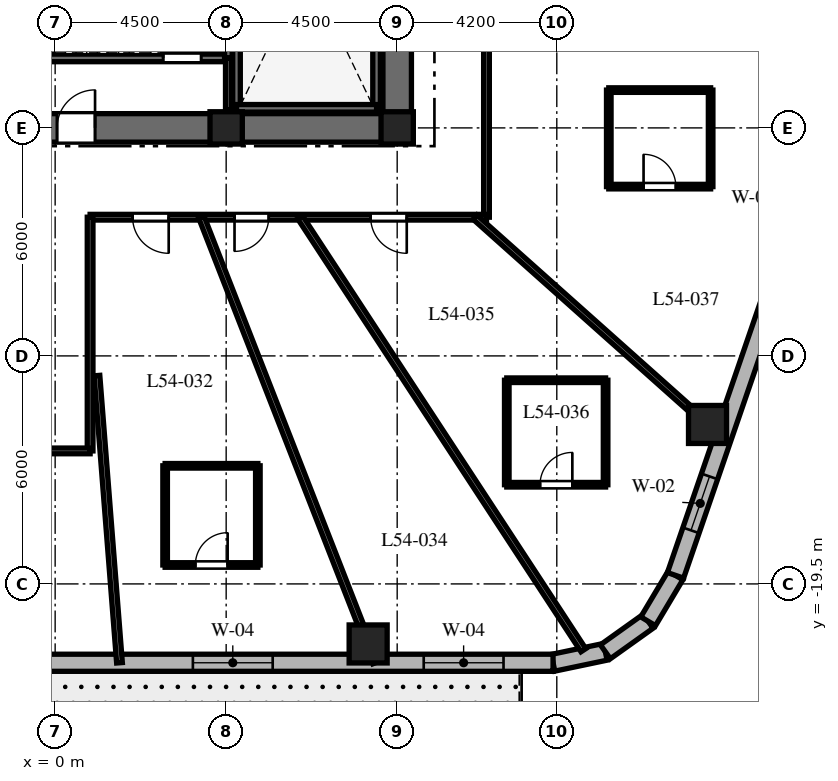
"""IFC4 building model, lengths in metres.
Left out: names, types, materials, properties, quantities, classifications, styles, units other than length and angle.
Written with IfcOpenShell. Run it as: python <this file> out.ifc"""

import sys

from ifc_helpers import new_model, si_unit, direction, frame, frame_2d, origin, origin_2d, place, context, subcontext, project, spatial, rectangle, extrude, element, fill, save


model = new_model("IFC4")
c1 = context("Model", 3, precision=1e-05, world=origin(), true_north=direction((0.0, 1.0)))
c2 = subcontext(c1, "Body", "Model", "MODEL_VIEW")
j1 = project(units=[si_unit("LENGTHUNIT", "METRE"), si_unit("PLANEANGLEUNIT", "RADIAN")], contexts=[c1])
p1 = place(None, origin())
s1 = spatial("IfcSite", under=j1, at=p1, CompositionType="ELEMENT")
p2 = place(p1, origin())
s2 = spatial("IfcBuilding", under=s1, at=p2, CompositionType="ELEMENT")
p3 = place(p2, frame((0.0, 0.0, 217.9)))
s3 = spatial("IfcBuildingStorey", under=s2, at=p3, CompositionType="ELEMENT", Elevation=217.9)
p4 = place(p3, frame((-9.375, -7.5, 0.0), z_axis=(0.0, 0.0, 1.0), x_axis=(1.0, 0.0, 0.0)))
e1 = element("IfcWall", 1, at=p4, inside=s3, PredefinedType="SHEAR", context=c2, shape_type="SweptSolid", body=[
    extrude(rectangle(XDim=18.75, YDim=0.75, at=frame_2d((9.375, 0.0))), origin(), (0.0, 0.0, 1.0), 3.8),
])
p5 = place(p4, frame((9.425, 0.0, 0.0)))
e2 = element("IfcOpeningElement", 2, at=p5, cuts=e1, PredefinedType="OPENING", context=c2, shape_type="SweptSolid", body=[
    extrude(rectangle(XDim=1.0, YDim=2.15, at=frame_2d((0.5, 1.075))), frame((0.0, 0.385, 0.0), z_axis=(0.0, -1.0, 0.0), x_axis=(1.0, 0.0, 0.0)), (0.0, 0.0, 1.0), 0.77),
])
p6 = place(p3, frame((9.0, -7.125, 0.0), z_axis=(0.0, 0.0, 1.0), x_axis=(0.0, 1.0, 0.0)))
e3 = element("IfcWall", 3, at=p6, inside=s3, PredefinedType="SHEAR", context=c2, shape_type="SweptSolid", body=[
    extrude(rectangle(XDim=14.25, YDim=0.75, at=frame_2d((7.125, 0.0))), origin(), (0.0, 0.0, 1.0), 3.8),
])
p7 = place(p6, frame((10.25, 0.0, 0.0)))
e4 = element("IfcOpeningElement", 4, at=p7, cuts=e3, PredefinedType="OPENING", context=c2, shape_type="SweptSolid", body=[
    extrude(rectangle(XDim=1.05, YDim=2.15, at=frame_2d((0.525, 1.075))), frame((0.0, 0.385, 0.0), z_axis=(0.0, -1.0, 0.0), x_axis=(1.0, 0.0, 0.0)), (0.0, 0.0, 1.0), 0.77),
])
for number, where, z_axis, x_axis in (
    (5, (4.772, -6.985, 0.0), (0.0, 0.0, 1.0), (0.0, 1.0, 0.0)),
    (6, (8.458, -6.985, 0.0), (0.0, 0.0, 1.0), (0.0, 1.0, 0.0)),
):
    element("IfcWall", number, at=place(p3, frame(where, z_axis=z_axis, x_axis=x_axis)), inside=s3, PredefinedType="SHEAR", context=c2, shape_type="SweptSolid", body=[
        extrude(rectangle(XDim=9.143, YDim=0.2, at=frame_2d((4.572, 0.0))), origin(), (0.0, 0.0, 1.0), 3.8),
    ])
p8 = place(p3, frame((4.772, -6.985, 0.0), z_axis=(0.0, 0.0, 1.0), x_axis=(1.0, 0.0, 0.0)))
e7 = element("IfcWall", 7, at=p8, inside=s3, PredefinedType="SHEAR", context=c2, shape_type="SweptSolid", body=[
    extrude(rectangle(XDim=3.686, YDim=0.2, at=frame_2d((1.843, 0.0))), origin(), (0.0, 0.0, 1.0), 3.8),
])
p9 = place(p3, frame((-4.608, -5.658, 0.0), z_axis=(0.0, 0.0, 1.0), x_axis=(1.0, 0.0, 0.0)))
e8 = element("IfcWall", 8, at=p9, inside=s3, PredefinedType="SHEAR", context=c2, shape_type="SweptSolid", body=[
    extrude(rectangle(XDim=9.166, YDim=0.2, at=frame_2d((4.583, 0.0))), origin(), (0.0, 0.0, 1.0), 3.8),
])
p10 = place(p9, frame((7.45, 0.0, 0.0)))
e9 = element("IfcOpeningElement", 9, at=p10, cuts=e8, PredefinedType="OPENING", context=c2, shape_type="SweptSolid", body=[
    extrude(rectangle(XDim=1.0, YDim=2.15, at=frame_2d((0.5, 1.075))), frame((0.0, 0.11, 0.0), z_axis=(0.0, -1.0, 0.0), x_axis=(1.0, 0.0, 0.0)), (0.0, 0.0, 1.0), 0.22),
])
p11 = place(p3, frame((4.558, -5.658, 0.0), z_axis=(0.0, 0.0, 1.0), x_axis=(0.0, 1.0, 0.0)))
e10 = element("IfcWall", 10, at=p11, inside=s3, PredefinedType="SHEAR", context=c2, shape_type="SweptSolid", body=[
    extrude(rectangle(XDim=3.686, YDim=0.2, at=frame_2d((1.843, 0.0))), origin(), (0.0, 0.0, 1.0), 3.8),
])
for number, where, z_axis, x_axis in (
    (11, (4.5, -7.5, 0.0), (0.0, 0.0, 1.0), (1.0, 0.0, 0.0)),
    (12, (9.0, -7.5, 0.0), (0.0, 0.0, 1.0), (1.0, 0.0, 0.0)),
):
    element("IfcColumn", number, at=place(p3, frame(where, z_axis=z_axis, x_axis=x_axis)), inside=s3, PredefinedType="COLUMN", context=c2, shape_type="SweptSolid", body=[
        extrude(rectangle(XDim=0.85, YDim=0.85, at=origin_2d()), origin(), (0.0, 0.0, 1.0), 3.8),
    ])
for number, where, z_axis, x_axis in (
    (13, (8.236, -21.08, 0.0), (0.0, 0.0, 1.0), (1.0, 0.0, 0.0)),
    (14, (17.166, -15.304, 0.0), (0.0, 0.0, 1.0), (1.0, 0.0, 0.0)),
):
    element("IfcColumn", number, at=place(p3, frame(where, z_axis=z_axis, x_axis=x_axis)), inside=s3, PredefinedType="COLUMN", context=c2, shape_type="SweptSolid", body=[
        extrude(rectangle(XDim=1.0, YDim=1.0, at=origin_2d()), origin(), (0.0, 0.0, 1.0), 3.8),
    ])
p12 = place(p3, frame((13.102, -21.575, 0.0), z_axis=(0.0, 0.0, 1.0), x_axis=(0.978757421505, 0.205021730188, 0.0)))
e15 = element("IfcWall", 15, at=p12, inside=s3, PredefinedType="SOLIDWALL", context=c2, shape_type="SweptSolid", body=[
    extrude(rectangle(XDim=1.406, YDim=0.45, at=frame_2d((0.703, 0.0))), origin(), (0.0, 0.0, 1.0), 3.5),
])
p13 = place(p3, frame((14.478, -21.287, 0.0), z_axis=(0.0, 0.0, 1.0), x_axis=(0.813888518617, 0.58102106611, 0.0)))
e16 = element("IfcWall", 16, at=p13, inside=s3, PredefinedType="SOLIDWALL", context=c2, shape_type="SweptSolid", body=[
    extrude(rectangle(XDim=1.383, YDim=0.45, at=frame_2d((0.691, 0.0))), origin(), (0.0, 0.0, 1.0), 3.5),
])
p14 = place(p3, frame((15.604, -20.483, 0.0), z_axis=(0.0, 0.0, 1.0), x_axis=(0.512222149036, 0.858852996756, 0.0)))
e17 = element("IfcWall", 17, at=p14, inside=s3, PredefinedType="SOLIDWALL", context=c2, shape_type="SweptSolid", body=[
    extrude(rectangle(XDim=1.406, YDim=0.45, at=frame_2d((0.703, 0.0))), origin(), (0.0, 0.0, 1.0), 3.5),
])
p15 = place(p3, frame((-11.298, -21.575, 0.0), z_axis=(0.0, 0.0, 1.0), x_axis=(1.0, 0.0, 0.0)))
e18 = element("IfcWall", 18, at=p15, inside=s3, PredefinedType="SOLIDWALL", context=c2, shape_type="SweptSolid", body=[
    extrude(rectangle(XDim=24.399, YDim=0.45, at=frame_2d((12.2, 0.0))), origin(), (0.0, 0.0, 1.0), 3.5),
])
p16 = place(p15, frame((2.55, 0.0, 0.0)))
e19 = element("IfcOpeningElement", 19, at=p16, cuts=e18, PredefinedType="OPENING", context=c2, shape_type="SweptSolid", body=[
    extrude(rectangle(XDim=1.0, YDim=2.15, at=frame_2d((0.5, 1.075))), frame((0.0, 0.235, 0.0), z_axis=(0.0, -1.0, 0.0), x_axis=(1.0, 0.0, 0.0)), (0.0, 0.0, 1.0), 0.47),
])
p17 = place(p15, frame((8.169, 0.0, 0.8)))
e20 = element("IfcOpeningElement", 20, at=p17, cuts=e18, PredefinedType="OPENING", context=c2, shape_type="SweptSolid", body=[
    extrude(rectangle(XDim=2.1, YDim=1.85, at=frame_2d((1.05, 0.925))), frame((0.0, 0.235, 0.0), z_axis=(0.0, -1.0, 0.0), x_axis=(1.0, 0.0, 0.0)), (0.0, 0.0, 1.0), 0.47),
])
p18 = place(p15, frame((14.922, 0.0, 0.8)))
e21 = element("IfcOpeningElement", 21, at=p18, cuts=e18, PredefinedType="OPENING", context=c2, shape_type="SweptSolid", body=[
    extrude(rectangle(XDim=2.1, YDim=1.85, at=frame_2d((1.05, 0.925))), frame((0.0, 0.235, 0.0), z_axis=(0.0, -1.0, 0.0), x_axis=(1.0, 0.0, 0.0)), (0.0, 0.0, 1.0), 0.47),
])
p19 = place(p15, frame((20.996, 0.0, 0.8)))
e22 = element("IfcOpeningElement", 22, at=p19, cuts=e18, PredefinedType="OPENING", context=c2, shape_type="SweptSolid", body=[
    extrude(rectangle(XDim=2.1, YDim=1.85, at=frame_2d((1.05, 0.925))), frame((0.0, 0.235, 0.0), z_axis=(0.0, -1.0, 0.0), x_axis=(1.0, 0.0, 0.0)), (0.0, 0.0, 1.0), 0.47),
])
p20 = place(p3, frame((16.324, -19.275, 0.0), z_axis=(0.0, 0.0, 1.0), x_axis=(0.325083142304, 0.945685439557, 0.0)))
e23 = element("IfcWall", 23, at=p20, inside=s3, PredefinedType="SOLIDWALL", context=c2, shape_type="SweptSolid", body=[
    extrude(rectangle(XDim=20.224, YDim=0.45, at=frame_2d((10.112, 0.0))), origin(), (0.0, 0.0, 1.0), 3.5),
])
p21 = place(p20, frame((1.253, 0.0, 0.8)))
e24 = element("IfcOpeningElement", 24, at=p21, cuts=e23, PredefinedType="OPENING", context=c2, shape_type="SweptSolid", body=[
    extrude(rectangle(XDim=1.5, YDim=1.8, at=frame_2d((0.75, 0.9))), frame((0.0, 0.235, 0.0), z_axis=(0.0, -1.0, 0.0), x_axis=(1.0, 0.0, 0.0)), (0.0, 0.0, 1.0), 0.47),
])
p22 = place(p20, frame((9.309, 0.0, 0.8)))
e25 = element("IfcOpeningElement", 25, at=p22, cuts=e23, PredefinedType="OPENING", context=c2, shape_type="SweptSolid", body=[
    extrude(rectangle(XDim=1.5, YDim=1.8, at=frame_2d((0.75, 0.9))), frame((0.0, 0.235, 0.0), z_axis=(0.0, -1.0, 0.0), x_axis=(1.0, 0.0, 0.0)), (0.0, 0.0, 1.0), 0.47),
])
p23 = place(p20, frame((17.418, 0.0, 0.8)))
e26 = element("IfcOpeningElement", 26, at=p23, cuts=e23, PredefinedType="OPENING", context=c2, shape_type="SweptSolid", body=[
    extrude(rectangle(XDim=1.5, YDim=1.8, at=frame_2d((0.75, 0.9))), frame((0.0, 0.235, 0.0), z_axis=(0.0, -1.0, 0.0), x_axis=(1.0, 0.0, 0.0)), (0.0, 0.0, 1.0), 0.47),
])
p24 = place(p3, frame((4.558, -7.02, 0.0), z_axis=(0.0, 0.0, 1.0), x_axis=(0.0, 1.0, 0.0)))
e27 = element("IfcWall", 27, at=p24, inside=s3, PredefinedType="PARTITIONING", context=c2, shape_type="SweptSolid", body=[
    extrude(rectangle(XDim=1.362, YDim=0.15, at=frame_2d((0.681, 0.0))), origin(), (0.0, 0.0, 1.0), 3.5),
])
p25 = place(p3, frame((11.35, -4.4, 0.0), z_axis=(0.0, 0.0, 1.0), x_axis=(0.0, -1.0, 0.0)))
e28 = element("IfcWall", 28, at=p25, inside=s3, PredefinedType="PARTITIONING", context=c2, shape_type="SweptSolid", body=[
    extrude(rectangle(XDim=5.45, YDim=0.15, at=frame_2d((2.725, 0.0))), origin(), (0.0, 0.0, 1.0), 2.99),
])
p26 = place(p3, frame((11.35, -9.85, 0.0), z_axis=(0.0, 0.0, 1.0), x_axis=(-1.0, 0.0, 0.0)))
e29 = element("IfcWall", 29, at=p26, inside=s3, PredefinedType="PARTITIONING", context=c2, shape_type="SweptSolid", body=[
    extrude(rectangle(XDim=10.43, YDim=0.15, at=frame_2d((5.215, 0.0))), origin(), (0.0, 0.0, 1.0), 2.99),
])
p27 = place(p26, frame((8.362, 0.0, 0.0)))
e30 = element("IfcOpeningElement", 30, at=p27, cuts=e29, PredefinedType="OPENING", context=c2, shape_type="SweptSolid", body=[
    extrude(rectangle(XDim=0.95, YDim=2.03, at=frame_2d((0.475, 1.015))), frame((0.0, 0.085, 0.0), z_axis=(0.0, -1.0, 0.0), x_axis=(1.0, 0.0, 0.0)), (0.0, 0.0, 1.0), 0.17),
])
p28 = place(p26, frame((5.73, 0.0, 0.0)))
e31 = element("IfcOpeningElement", 31, at=p28, cuts=e29, PredefinedType="OPENING", context=c2, shape_type="SweptSolid", body=[
    extrude(rectangle(XDim=0.9, YDim=2.03, at=frame_2d((0.45, 1.015))), frame((0.0, 0.085, 0.0), z_axis=(0.0, -1.0, 0.0), x_axis=(1.0, 0.0, 0.0)), (0.0, 0.0, 1.0), 0.17),
])
p29 = place(p26, frame((2.098, 0.0, 0.0)))
e32 = element("IfcOpeningElement", 32, at=p29, cuts=e29, PredefinedType="OPENING", context=c2, shape_type="SweptSolid", body=[
    extrude(rectangle(XDim=0.95, YDim=2.03, at=frame_2d((0.475, 1.015))), frame((0.0, 0.085, 0.0), z_axis=(0.0, -1.0, 0.0), x_axis=(1.0, 0.0, 0.0)), (0.0, 0.0, 1.0), 0.17),
])
p30 = place(p3, frame((0.92, -9.85, 0.0), z_axis=(0.0, 0.0, 1.0), x_axis=(0.0, -1.0, 0.0)))
e33 = element("IfcWall", 33, at=p30, inside=s3, PredefinedType="PARTITIONING", context=c2, shape_type="SweptSolid", body=[
    extrude(rectangle(XDim=6.15, YDim=0.15, at=frame_2d((3.075, 0.0))), origin(), (0.0, 0.0, 1.0), 3.027),
])
p31 = place(p3, frame((0.92, -16.0, 0.0), z_axis=(0.0, 0.0, 1.0), x_axis=(-1.0, 0.0, 0.0)))
e34 = element("IfcWall", 34, at=p31, inside=s3, PredefinedType="PARTITIONING", context=c2, shape_type="SweptSolid", body=[
    extrude(rectangle(XDim=1.84, YDim=0.15, at=frame_2d((0.92, 0.0))), origin(), (0.0, 0.0, 1.0), 3.5),
])
p32 = place(p3, frame((1.1, -14.018, 0.0), z_axis=(0.0, 0.0, 1.0), x_axis=(0.078228275349, -0.996935472804, 0.0)))
e35 = element("IfcWall", 35, at=p32, inside=s3, PredefinedType="PARTITIONING", context=c2, shape_type="SweptSolid", body=[
    extrude(rectangle(XDim=7.581, YDim=0.15, at=frame_2d((3.79, 0.0))), origin(), (0.0, 0.0, 1.0), 2.74),
])
p33 = place(p3, frame((3.848, -9.85, 0.0), z_axis=(0.0, 0.0, 1.0), x_axis=(0.363921778212, -0.931429513889, 0.0)))
e36 = element("IfcWall", 36, at=p33, inside=s3, PredefinedType="PARTITIONING", context=c2, shape_type="SweptSolid", body=[
    extrude(rectangle(XDim=12.588, YDim=0.15, at=frame_2d((6.294, 0.0))), origin(), (0.0, 0.0, 1.0), 2.74),
])
p34 = place(p3, frame((6.444, -9.85, 0.0), z_axis=(0.0, 0.0, 1.0), x_axis=(0.547492333129, -0.836810698525, 0.0)))
e37 = element("IfcWall", 37, at=p34, inside=s3, PredefinedType="PARTITIONING", context=c2, shape_type="SweptSolid", body=[
    extrude(rectangle(XDim=13.616, YDim=0.15, at=frame_2d((6.808, 0.0))), origin(), (0.0, 0.0, 1.0), 2.74),
])
p35 = place(p3, frame((11.048, -9.85, 0.0), z_axis=(0.0, 0.0, 1.0), x_axis=(0.746444434655, -0.665447748492, 0.0)))
e38 = element("IfcWall", 38, at=p35, inside=s3, PredefinedType="PARTITIONING", context=c2, shape_type="SweptSolid", body=[
    extrude(rectangle(XDim=8.732, YDim=0.15, at=frame_2d((4.366, 0.0))), origin(), (0.0, 0.0, 1.0), 2.74),
])
p36 = place(p3, frame((2.894, -19.002, 0.0), z_axis=(0.0, 0.0, 1.0), x_axis=(1.0, 0.0, 0.0)))
e39 = element("IfcWall", 39, at=p36, inside=s3, PredefinedType="PARTITIONING", context=c2, shape_type="SweptSolid", body=[
    extrude(rectangle(XDim=2.44, YDim=0.12, at=frame_2d((1.22, 0.0))), origin(), (0.0, 0.0, 1.0), 3.5),
])
p37 = place(p36, frame((0.795, 0.0, 0.0)))
e40 = element("IfcOpeningElement", 40, at=p37, cuts=e39, PredefinedType="OPENING", context=c2, shape_type="SweptSolid", body=[
    extrude(rectangle(XDim=0.85, YDim=2.03, at=frame_2d((0.425, 1.015))), frame((0.0, 0.07, 0.0), z_axis=(0.0, -1.0, 0.0), x_axis=(1.0, 0.0, 0.0)), (0.0, 0.0, 1.0), 0.14),
])
p38 = place(p3, frame((5.334, -19.002, 0.0), z_axis=(0.0, 0.0, 1.0), x_axis=(0.0, 1.0, 0.0)))
e41 = element("IfcWall", 41, at=p38, inside=s3, PredefinedType="PARTITIONING", context=c2, shape_type="SweptSolid", body=[
    extrude(rectangle(XDim=2.61, YDim=0.12, at=frame_2d((1.305, 0.0))), origin(), (0.0, 0.0, 1.0), 2.941),
])
p39 = place(p3, frame((5.334, -16.392, 0.0), z_axis=(0.0, 0.0, 1.0), x_axis=(-1.0, 0.0, 0.0)))
e42 = element("IfcWall", 42, at=p39, inside=s3, PredefinedType="PARTITIONING", context=c2, shape_type="SweptSolid", body=[
    extrude(rectangle(XDim=2.44, YDim=0.12, at=frame_2d((1.22, 0.0))), origin(), (0.0, 0.0, 1.0), 3.5),
])
p40 = place(p3, frame((2.894, -16.392, 0.0), z_axis=(0.0, 0.0, 1.0), x_axis=(0.0, -1.0, 0.0)))
e43 = element("IfcWall", 43, at=p40, inside=s3, PredefinedType="PARTITIONING", context=c2, shape_type="SweptSolid", body=[
    extrude(rectangle(XDim=2.61, YDim=0.12, at=frame_2d((1.305, 0.0))), origin(), (0.0, 0.0, 1.0), 2.941),
])
p41 = place(p3, frame((11.884, -16.89, 0.0), z_axis=(0.0, 0.0, 1.0), x_axis=(1.0, 0.0, 0.0)))
e44 = element("IfcWall", 44, at=p41, inside=s3, PredefinedType="PARTITIONING", context=c2, shape_type="SweptSolid", body=[
    extrude(rectangle(XDim=2.6, YDim=0.12, at=frame_2d((1.3, 0.0))), origin(), (0.0, 0.0, 1.0), 2.74),
])
p42 = place(p41, frame((0.875, 0.0, 0.0)))
e45 = element("IfcOpeningElement", 45, at=p42, cuts=e44, PredefinedType="OPENING", context=c2, shape_type="SweptSolid", body=[
    extrude(rectangle(XDim=0.85, YDim=2.03, at=frame_2d((0.425, 1.015))), frame((0.0, 0.07, 0.0), z_axis=(0.0, -1.0, 0.0), x_axis=(1.0, 0.0, 0.0)), (0.0, 0.0, 1.0), 0.14),
])
p43 = place(p3, frame((14.484, -16.89, 0.0), z_axis=(0.0, 0.0, 1.0), x_axis=(0.0, 1.0, 0.0)))
e46 = element("IfcWall", 46, at=p43, inside=s3, PredefinedType="PARTITIONING", context=c2, shape_type="SweptSolid", body=[
    extrude(rectangle(XDim=2.75, YDim=0.12, at=frame_2d((1.375, 0.0))), origin(), (0.0, 0.0, 1.0), 2.74),
])
p44 = place(p3, frame((14.484, -14.14, 0.0), z_axis=(0.0, 0.0, 1.0), x_axis=(-1.0, 0.0, 0.0)))
e47 = element("IfcWall", 47, at=p44, inside=s3, PredefinedType="PARTITIONING", context=c2, shape_type="SweptSolid", body=[
    extrude(rectangle(XDim=2.6, YDim=0.12, at=frame_2d((1.3, 0.0))), origin(), (0.0, 0.0, 1.0), 3.027),
])
p45 = place(p3, frame((11.884, -14.14, 0.0), z_axis=(0.0, 0.0, 1.0), x_axis=(0.0, -1.0, 0.0)))
e48 = element("IfcWall", 48, at=p45, inside=s3, PredefinedType="PARTITIONING", context=c2, shape_type="SweptSolid", body=[
    extrude(rectangle(XDim=2.75, YDim=0.12, at=frame_2d((1.375, 0.0))), origin(), (0.0, 0.0, 1.0), 3.027),
])
p46 = place(p3, frame((14.568, -9.045, 0.0), z_axis=(0.0, 0.0, 1.0), x_axis=(1.0, 0.0, 0.0)))
e49 = element("IfcWall", 49, at=p46, inside=s3, PredefinedType="PARTITIONING", context=c2, shape_type="SweptSolid", body=[
    extrude(rectangle(XDim=2.68, YDim=0.12, at=frame_2d((1.34, 0.0))), origin(), (0.0, 0.0, 1.0), 3.073),
])
p47 = place(p46, frame((0.915, 0.0, 0.0)))
e50 = element("IfcOpeningElement", 50, at=p47, cuts=e49, PredefinedType="OPENING", context=c2, shape_type="SweptSolid", body=[
    extrude(rectangle(XDim=0.85, YDim=2.03, at=frame_2d((0.425, 1.015))), frame((0.0, 0.07, 0.0), z_axis=(0.0, -1.0, 0.0), x_axis=(1.0, 0.0, 0.0)), (0.0, 0.0, 1.0), 0.14),
])
p48 = place(p3, frame((17.248, -9.045, 0.0), z_axis=(0.0, 0.0, 1.0), x_axis=(0.0, 1.0, 0.0)))
e51 = element("IfcWall", 51, at=p48, inside=s3, PredefinedType="PARTITIONING", context=c2, shape_type="SweptSolid", body=[
    extrude(rectangle(XDim=2.54, YDim=0.12, at=frame_2d((1.27, 0.0))), origin(), (0.0, 0.0, 1.0), 3.5),
])
p49 = place(p3, frame((17.248, -6.505, 0.0), z_axis=(0.0, 0.0, 1.0), x_axis=(-1.0, 0.0, 0.0)))
e52 = element("IfcWall", 52, at=p49, inside=s3, PredefinedType="PARTITIONING", context=c2, shape_type="SweptSolid", body=[
    extrude(rectangle(XDim=2.68, YDim=0.12, at=frame_2d((1.34, 0.0))), origin(), (0.0, 0.0, 1.0), 3.073),
])
p50 = place(p3, frame((14.568, -6.505, 0.0), z_axis=(0.0, 0.0, 1.0), x_axis=(0.0, -1.0, 0.0)))
e53 = element("IfcWall", 53, at=p50, inside=s3, PredefinedType="PARTITIONING", context=c2, shape_type="SweptSolid", body=[
    extrude(rectangle(XDim=2.54, YDim=0.12, at=frame_2d((1.27, 0.0))), origin(), (0.0, 0.0, 1.0), 3.5),
])
p51 = place(p18, origin())
e54 = element("IfcWindow", 54, at=p51, inside=s3, PartitioningType="SINGLE_PANEL", PredefinedType="WINDOW", context=c2, shape_type="SweptSolid", body=[
    extrude(rectangle(XDim=2.1, YDim=1.85, at=frame_2d((1.05, 0.925))), frame((0.0, 0.03, 0.0), z_axis=(0.0, -1.0, 0.0), x_axis=(1.0, 0.0, 0.0)), (0.0, 0.0, 1.0), 0.06),
])
fill(e21, e54)
p52 = place(p19, origin())
e55 = element("IfcWindow", 55, at=p52, inside=s3, PartitioningType="SINGLE_PANEL", PredefinedType="WINDOW", context=c2, shape_type="SweptSolid", body=[
    extrude(rectangle(XDim=2.1, YDim=1.85, at=frame_2d((1.05, 0.925))), frame((0.0, 0.03, 0.0), z_axis=(0.0, -1.0, 0.0), x_axis=(1.0, 0.0, 0.0)), (0.0, 0.0, 1.0), 0.06),
])
fill(e22, e55)
p53 = place(p21, origin())
e56 = element("IfcWindow", 56, at=p53, inside=s3, PartitioningType="SINGLE_PANEL", PredefinedType="WINDOW", context=c2, shape_type="SweptSolid", body=[
    extrude(rectangle(XDim=1.5, YDim=1.8, at=frame_2d((0.75, 0.9))), frame((0.0, 0.03, 0.0), z_axis=(0.0, -1.0, 0.0), x_axis=(1.0, 0.0, 0.0)), (0.0, 0.0, 1.0), 0.06),
])
fill(e24, e56)
p54 = place(p10, origin())
e57 = element("IfcDoor", 57, at=p54, inside=s3, OperationType="SINGLE_SWING_LEFT", PredefinedType="DOOR", context=c2, shape_type="SweptSolid", body=[
    extrude(rectangle(XDim=1.0, YDim=2.15, at=frame_2d((0.5, 1.075))), frame((0.0, 0.025, 0.0), z_axis=(0.0, -1.0, 0.0), x_axis=(1.0, 0.0, 0.0)), (0.0, 0.0, 1.0), 0.05),
])
fill(e9, e57)
p55 = place(p5, origin())
e58 = element("IfcDoor", 58, at=p55, inside=s3, OperationType="SINGLE_SWING_RIGHT", PredefinedType="DOOR", context=c2, shape_type="SweptSolid", body=[
    extrude(rectangle(XDim=1.0, YDim=2.15, at=frame_2d((0.5, 1.075))), frame((0.0, 0.025, 0.0), z_axis=(0.0, -1.0, 0.0), x_axis=(1.0, 0.0, 0.0)), (0.0, 0.0, 1.0), 0.05),
])
fill(e2, e58)
p56 = place(p27, origin())
e59 = element("IfcDoor", 59, at=p56, inside=s3, OperationType="SINGLE_SWING_LEFT", PredefinedType="DOOR", context=c2, shape_type="SweptSolid", body=[
    extrude(rectangle(XDim=0.95, YDim=2.03, at=frame_2d((0.475, 1.015))), frame((0.0, 0.025, 0.0), z_axis=(0.0, -1.0, 0.0), x_axis=(1.0, 0.0, 0.0)), (0.0, 0.0, 1.0), 0.05),
])
fill(e30, e59)
p57 = place(p37, origin())
e60 = element("IfcDoor", 60, at=p57, inside=s3, OperationType="SINGLE_SWING_RIGHT", PredefinedType="DOOR", context=c2, shape_type="SweptSolid", body=[
    extrude(rectangle(XDim=0.85, YDim=2.03, at=frame_2d((0.425, 1.015))), frame((0.0, 0.025, 0.0), z_axis=(0.0, -1.0, 0.0), x_axis=(1.0, 0.0, 0.0)), (0.0, 0.0, 1.0), 0.05),
])
fill(e40, e60)
p58 = place(p28, origin())
e61 = element("IfcDoor", 61, at=p58, inside=s3, OperationType="SINGLE_SWING_RIGHT", PredefinedType="DOOR", context=c2, shape_type="SweptSolid", body=[
    extrude(rectangle(XDim=0.9, YDim=2.03, at=frame_2d((0.45, 1.015))), frame((0.0, 0.025, 0.0), z_axis=(0.0, -1.0, 0.0), x_axis=(1.0, 0.0, 0.0)), (0.0, 0.0, 1.0), 0.05),
])
fill(e31, e61)
p59 = place(p29, origin())
e62 = element("IfcDoor", 62, at=p59, inside=s3, OperationType="SINGLE_SWING_LEFT", PredefinedType="DOOR", context=c2, shape_type="SweptSolid", body=[
    extrude(rectangle(XDim=0.95, YDim=2.03, at=frame_2d((0.475, 1.015))), frame((0.0, 0.025, 0.0), z_axis=(0.0, -1.0, 0.0), x_axis=(1.0, 0.0, 0.0)), (0.0, 0.0, 1.0), 0.05),
])
fill(e32, e62)
p60 = place(p42, origin())
e63 = element("IfcDoor", 63, at=p60, inside=s3, OperationType="SINGLE_SWING_RIGHT", PredefinedType="DOOR", context=c2, shape_type="SweptSolid", body=[
    extrude(rectangle(XDim=0.85, YDim=2.03, at=frame_2d((0.425, 1.015))), frame((0.0, 0.025, 0.0), z_axis=(0.0, -1.0, 0.0), x_axis=(1.0, 0.0, 0.0)), (0.0, 0.0, 1.0), 0.05),
])
fill(e45, e63)
p61 = place(p47, origin())
e64 = element("IfcDoor", 64, at=p61, inside=s3, OperationType="SINGLE_SWING_LEFT", PredefinedType="DOOR", context=c2, shape_type="SweptSolid", body=[
    extrude(rectangle(XDim=0.85, YDim=2.03, at=frame_2d((0.425, 1.015))), frame((0.0, 0.025, 0.0), z_axis=(0.0, -1.0, 0.0), x_axis=(1.0, 0.0, 0.0)), (0.0, 0.0, 1.0), 0.05),
])
fill(e50, e64)
save(model, sys.argv[1])
